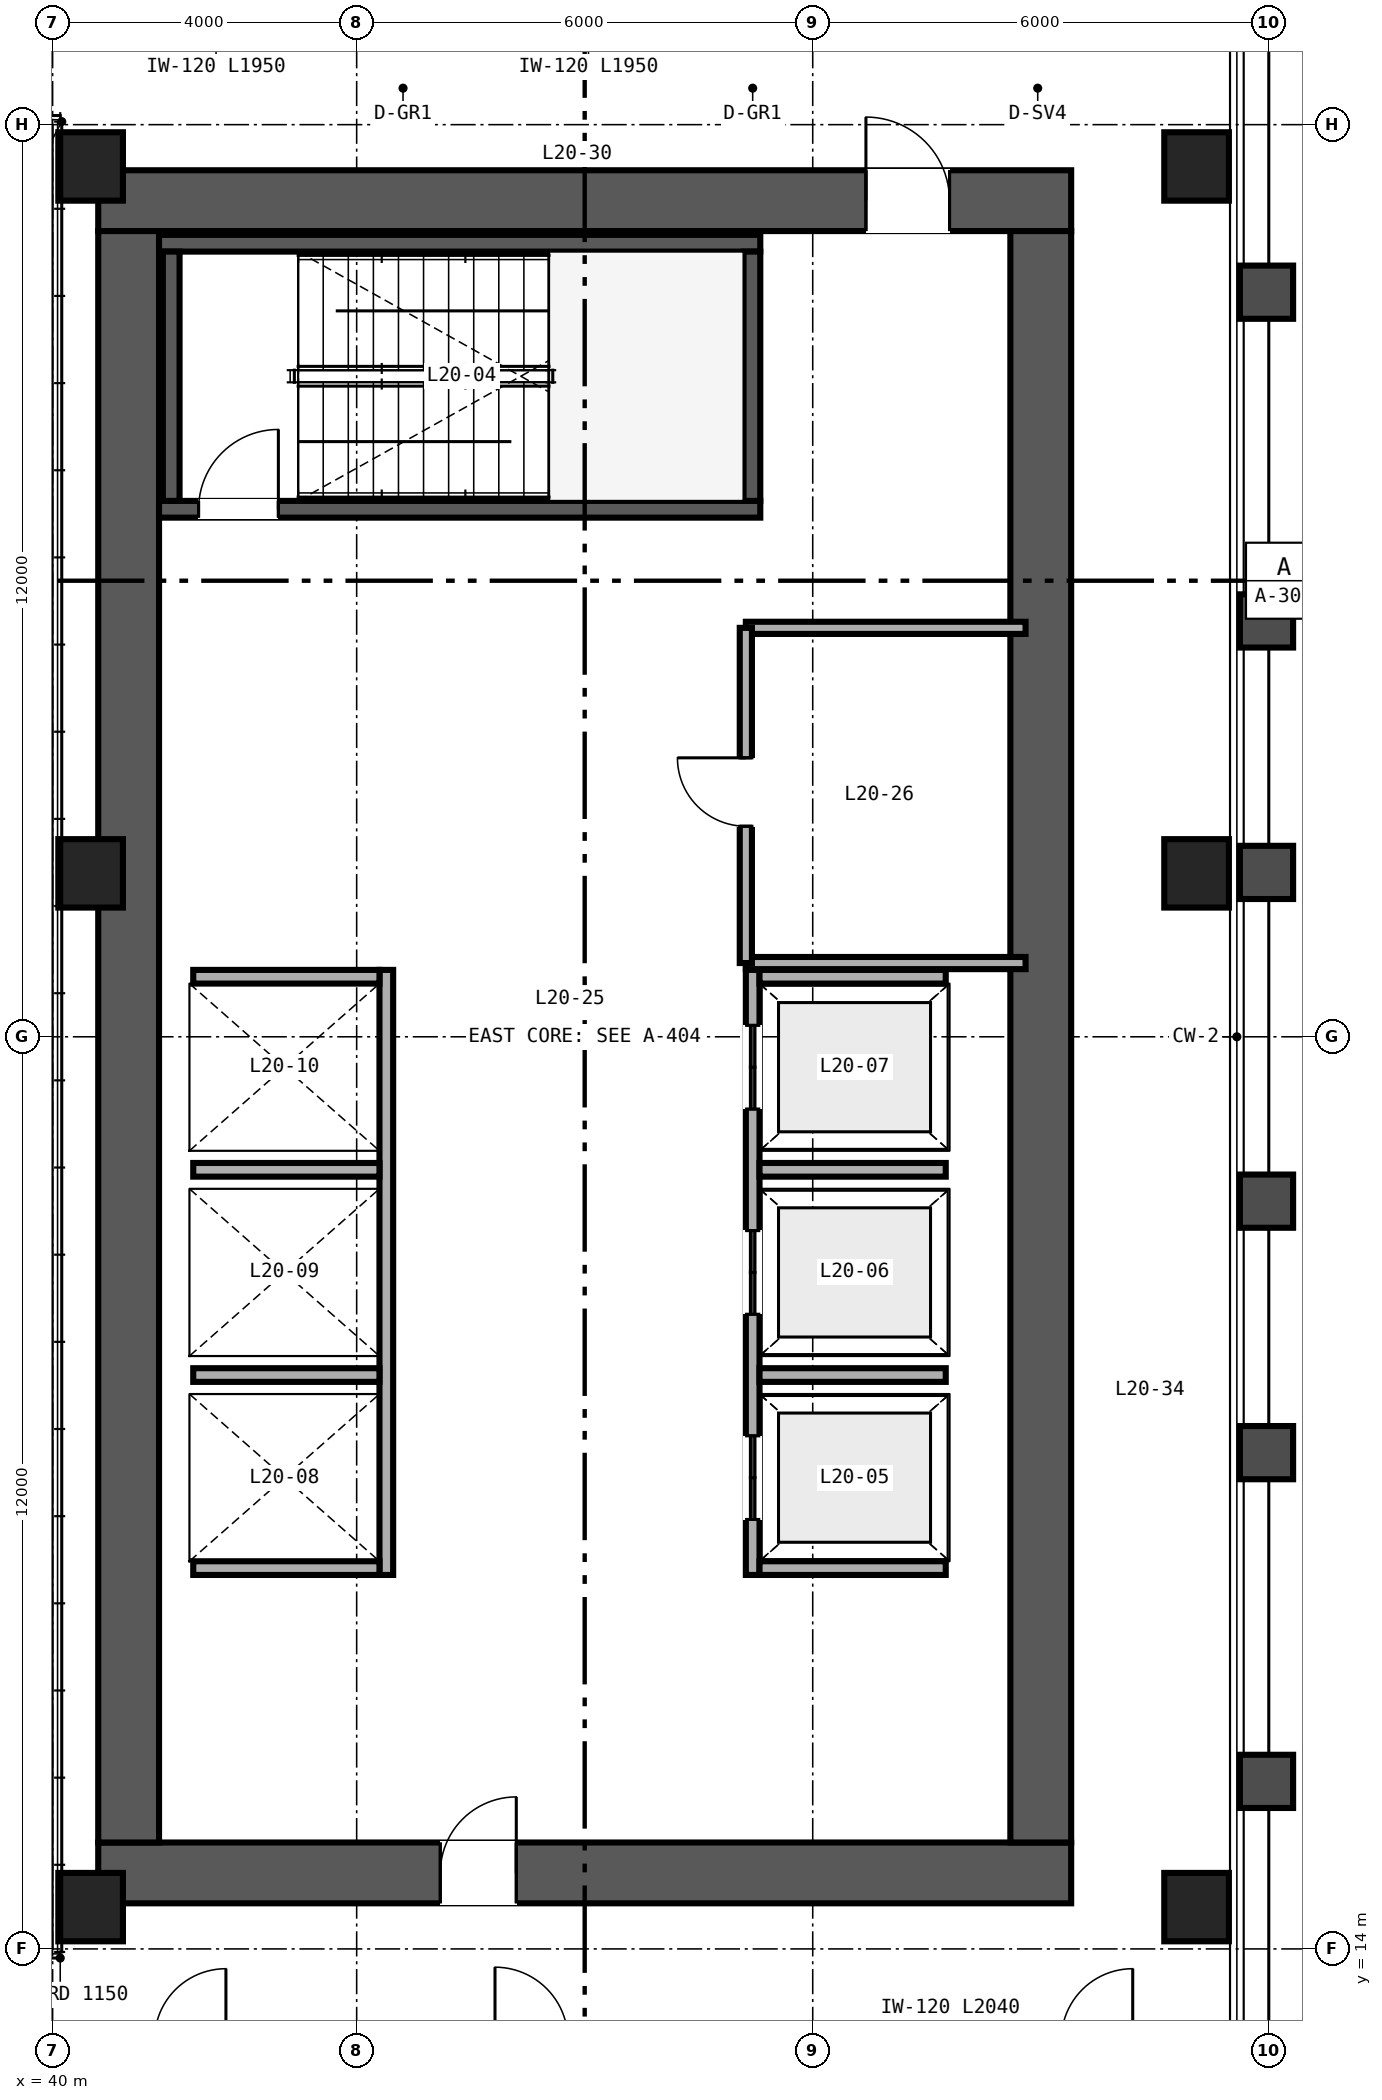
"""IFC4 building model, lengths in metres.
Left out: names, types, materials, properties, quantities, classifications, styles, units other than length and angle.
Written with IfcOpenShell. Run it as: python <this file> out.ifc"""

import sys

from ifc_helpers import new_model, si_unit, direction, frame, frame_2d, origin, origin_2d, place, context, subcontext, project, spatial, rectangle, hollow_rectangle, extrude, source, transform, mapped, element, fill, save


model = new_model("IFC4")
c1 = context("Model", 3, precision=1e-05, world=origin(), true_north=direction((0.0, 1.0)))
c2 = subcontext(c1, "Body", "Model", "MODEL_VIEW")
j1 = project(units=[si_unit("LENGTHUNIT", "METRE"), si_unit("PLANEANGLEUNIT", "RADIAN")], contexts=[c1])
p1 = place(None, origin())
s1 = spatial("IfcSite", under=j1, at=p1, CompositionType="ELEMENT")
p2 = place(p1, origin())
s2 = spatial("IfcBuilding", under=s1, at=p2, CompositionType="ELEMENT")
p3 = place(p2, frame((0.0, 0.0, 81.6)))
s3 = spatial("IfcBuildingStorey", under=s2, at=p3, CompositionType="ELEMENT", Elevation=81.6)
p4 = place(p3, frame((40.6, 15.0, 0.0), z_axis=(0.0, 0.0, 1.0), x_axis=(1.0, 0.0, 0.0)))
e1 = element("IfcWall", 1, at=p4, inside=s3, PredefinedType="SHEAR", context=c2, shape_type="SweptSolid", body=[
    extrude(rectangle(XDim=12.8, YDim=0.8, at=frame_2d((6.4, 0.0))), origin(), (0.0, 0.0, 1.0), 3.28),
])
p5 = place(p4, frame((4.5, 0.0, 0.0)))
e2 = element("IfcOpeningElement", 2, at=p5, cuts=e1, PredefinedType="OPENING", context=c2, shape_type="SweptSolid", body=[
    extrude(rectangle(XDim=1.0, YDim=2.15, at=frame_2d((0.5, 1.075))), frame((0.0, 0.41, 0.0), z_axis=(0.0, -1.0, 0.0), x_axis=(1.0, 0.0, 0.0)), (0.0, 0.0, 1.0), 0.82),
])
p6 = place(p3, frame((40.6, 37.0, 0.0), z_axis=(0.0, 0.0, 1.0), x_axis=(1.0, 0.0, 0.0)))
e3 = element("IfcWall", 3, at=p6, inside=s3, PredefinedType="SHEAR", context=c2, shape_type="SweptSolid", body=[
    extrude(rectangle(XDim=12.8, YDim=0.8, at=frame_2d((6.4, 0.0))), origin(), (0.0, 0.0, 1.0), 3.28),
])
p7 = place(p6, frame((10.1, 0.0, 0.0)))
e4 = element("IfcOpeningElement", 4, at=p7, cuts=e3, PredefinedType="OPENING", context=c2, shape_type="SweptSolid", body=[
    extrude(rectangle(XDim=1.1, YDim=2.15, at=frame_2d((0.55, 1.075))), frame((0.0, 0.41, 0.0), z_axis=(0.0, -1.0, 0.0), x_axis=(1.0, 0.0, 0.0)), (0.0, 0.0, 1.0), 0.82),
])
for number, where, z_axis, x_axis in (
    (5, (41.0, 15.4, 0.0), (0.0, 0.0, 1.0), (0.0, 1.0, 0.0)),
    (6, (53.0, 15.4, 0.0), (0.0, 0.0, 1.0), (0.0, 1.0, 0.0)),
):
    element("IfcWall", number, at=place(p3, frame(where, z_axis=z_axis, x_axis=x_axis)), inside=s3, PredefinedType="SHEAR", context=c2, shape_type="SweptSolid", body=[
        extrude(rectangle(XDim=21.2, YDim=0.8, at=frame_2d((10.6, 0.0))), origin(), (0.0, 0.0, 1.0), 3.28),
    ])
p8 = place(p3, frame((41.4, 32.94, 0.0), z_axis=(0.0, 0.0, 1.0), x_axis=(1.0, 0.0, 0.0)))
e7 = element("IfcWall", 7, at=p8, inside=s3, PredefinedType="SHEAR", context=c2, shape_type="SweptSolid", body=[
    extrude(rectangle(XDim=7.91, YDim=0.22, at=frame_2d((3.955, 0.0))), origin(), (0.0, 0.0, 1.0), 3.4),
])
p9 = place(p8, frame((0.52, 0.0, 0.0)))
e8 = element("IfcOpeningElement", 8, at=p9, cuts=e7, PredefinedType="OPENING", context=c2, shape_type="SweptSolid", body=[
    extrude(rectangle(XDim=1.05, YDim=2.15, at=frame_2d((0.525, 1.075))), frame((0.0, 0.12, 0.0), z_axis=(0.0, -1.0, 0.0), x_axis=(1.0, 0.0, 0.0)), (0.0, 0.0, 1.0), 0.24),
])
p10 = place(p3, frame((41.4, 36.44, 0.0), z_axis=(0.0, 0.0, 1.0), x_axis=(1.0, 0.0, 0.0)))
e9 = element("IfcWall", 9, at=p10, inside=s3, PredefinedType="SHEAR", context=c2, shape_type="SweptSolid", body=[
    extrude(rectangle(XDim=7.91, YDim=0.22, at=frame_2d((3.955, 0.0))), origin(), (0.0, 0.0, 1.0), 3.4),
])
for number, where, z_axis, x_axis in (
    (10, (41.56, 33.05, 0.0), (0.0, 0.0, 1.0), (0.0, 1.0, 0.0)),
    (11, (49.2, 33.05, 0.0), (0.0, 0.0, 1.0), (0.0, 1.0, 0.0)),
):
    element("IfcWall", number, at=place(p3, frame(where, z_axis=z_axis, x_axis=x_axis)), inside=s3, PredefinedType="SHEAR", context=c2, shape_type="SweptSolid", body=[
        extrude(rectangle(XDim=3.28, YDim=0.22, at=frame_2d((1.64, 0.0))), origin(), (0.0, 0.0, 1.0), 3.4),
    ])
m1 = source(origin(), c2, "Body", "SweptSolid", [
    extrude(hollow_rectangle(XDim=0.85, YDim=0.9, WallThickness=0.04, at=origin_2d()), origin(), (0.0, 0.0, 1.0), 3.28),
])
for number, where, z_axis, x_axis in (
    (12, (40.5, 14.55, 0.0), (0.0, 0.0, 1.0), (1.0, 0.0, 0.0)),
    (13, (55.05, 14.55, 0.0), (0.0, 0.0, 1.0), (1.0, 0.0, 0.0)),
    (14, (40.5, 28.15, 0.0), (0.0, 0.0, 1.0), (1.0, 0.0, 0.0)),
    (15, (55.05, 28.15, 0.0), (0.0, 0.0, 1.0), (1.0, 0.0, 0.0)),
    (16, (40.5, 37.45, 0.0), (0.0, 0.0, 1.0), (1.0, 0.0, 0.0)),
    (17, (55.05, 37.45, 0.0), (0.0, 0.0, 1.0), (1.0, 0.0, 0.0)),
):
    element("IfcColumn", number, at=place(p3, frame(where, z_axis=z_axis, x_axis=x_axis)), inside=s3, PredefinedType="COLUMN", context=c2, shape_type="MappedRepresentation", body=[
        mapped(m1, transform((0.0, 0.0, 0.0), scale=1.0)),
    ])
p11 = place(p3, frame((49.21, 18.92, 0.0), z_axis=(0.0, 0.0, 1.0), x_axis=(0.0, 1.0, 0.0)))
e18 = element("IfcWall", 18, at=p11, inside=s3, PredefinedType="SOLIDWALL", context=c2, shape_type="SweptSolid", body=[
    extrude(rectangle(XDim=7.96, YDim=0.18, at=frame_2d((3.98, 0.0))), origin(), (0.0, 0.0, 1.0), 3.28),
])
p12 = place(p11, frame((0.73, 0.0, 0.0)))
e19 = element("IfcOpeningElement", 19, at=p12, cuts=e18, PredefinedType="OPENING", context=c2, shape_type="SweptSolid", body=[
    extrude(rectangle(XDim=1.1, YDim=2.2, at=frame_2d((0.55, 1.1))), frame((0.0, 0.1, 0.0), z_axis=(0.0, -1.0, 0.0), x_axis=(1.0, 0.0, 0.0)), (0.0, 0.0, 1.0), 0.2),
])
p13 = place(p11, frame((3.43, 0.0, 0.0)))
e20 = element("IfcOpeningElement", 20, at=p13, cuts=e18, PredefinedType="OPENING", context=c2, shape_type="SweptSolid", body=[
    extrude(rectangle(XDim=1.1, YDim=2.2, at=frame_2d((0.55, 1.1))), frame((0.0, 0.1, 0.0), z_axis=(0.0, -1.0, 0.0), x_axis=(1.0, 0.0, 0.0)), (0.0, 0.0, 1.0), 0.2),
])
p14 = place(p11, frame((6.13, 0.0, 0.0)))
e21 = element("IfcOpeningElement", 21, at=p14, cuts=e18, PredefinedType="OPENING", context=c2, shape_type="SweptSolid", body=[
    extrude(rectangle(XDim=1.1, YDim=2.2, at=frame_2d((0.55, 1.1))), frame((0.0, 0.1, 0.0), z_axis=(0.0, -1.0, 0.0), x_axis=(1.0, 0.0, 0.0)), (0.0, 0.0, 1.0), 0.2),
])
for number, where, z_axis, x_axis in (
    (22, (49.3, 19.01, 0.0), (0.0, 0.0, 1.0), (1.0, 0.0, 0.0)),
    (23, (49.3, 26.79, 0.0), (0.0, 0.0, 1.0), (1.0, 0.0, 0.0)),
    (24, (49.3, 21.55, 0.0), (0.0, 0.0, 1.0), (1.0, 0.0, 0.0)),
    (25, (49.3, 24.25, 0.0), (0.0, 0.0, 1.0), (1.0, 0.0, 0.0)),
):
    element("IfcWall", number, at=place(p3, frame(where, z_axis=z_axis, x_axis=x_axis)), inside=s3, PredefinedType="SOLIDWALL", context=c2, shape_type="SweptSolid", body=[
        extrude(rectangle(XDim=2.45, YDim=0.18, at=frame_2d((1.225, 0.0))), origin(), (0.0, 0.0, 1.0), 3.28),
    ])
p15 = place(p3, frame((44.39, 18.92, 0.0), z_axis=(0.0, 0.0, 1.0), x_axis=(0.0, 1.0, 0.0)))
e26 = element("IfcWall", 26, at=p15, inside=s3, PredefinedType="SOLIDWALL", context=c2, shape_type="SweptSolid", body=[
    extrude(rectangle(XDim=7.96, YDim=0.18, at=frame_2d((3.98, 0.0))), origin(), (0.0, 0.0, 1.0), 3.28),
])
for number, where, z_axis, x_axis in (
    (27, (41.85, 19.01, 0.0), (0.0, 0.0, 1.0), (1.0, 0.0, 0.0)),
    (28, (41.85, 26.79, 0.0), (0.0, 0.0, 1.0), (1.0, 0.0, 0.0)),
    (29, (41.85, 21.55, 0.0), (0.0, 0.0, 1.0), (1.0, 0.0, 0.0)),
    (30, (41.85, 24.25, 0.0), (0.0, 0.0, 1.0), (1.0, 0.0, 0.0)),
):
    element("IfcWall", number, at=place(p3, frame(where, z_axis=z_axis, x_axis=x_axis)), inside=s3, PredefinedType="SOLIDWALL", context=c2, shape_type="SweptSolid", body=[
        extrude(rectangle(XDim=2.45, YDim=0.18, at=frame_2d((1.225, 0.0))), origin(), (0.0, 0.0, 1.0), 3.28),
    ])
p16 = place(p3, frame((49.12, 26.97, 0.0), z_axis=(0.0, 0.0, 1.0), x_axis=(1.0, 0.0, 0.0)))
e31 = element("IfcWall", 31, at=p16, inside=s3, PredefinedType="PARTITIONING", context=c2, shape_type="SweptSolid", body=[
    extrude(rectangle(XDim=3.68, YDim=0.16, at=frame_2d((1.84, 0.0))), origin(), (0.0, 0.0, 1.0), 3.28),
])
p17 = place(p3, frame((49.12, 31.38, 0.0), z_axis=(0.0, 0.0, 1.0), x_axis=(1.0, 0.0, 0.0)))
e32 = element("IfcWall", 32, at=p17, inside=s3, PredefinedType="PARTITIONING", context=c2, shape_type="SweptSolid", body=[
    extrude(rectangle(XDim=3.68, YDim=0.16, at=frame_2d((1.84, 0.0))), origin(), (0.0, 0.0, 1.0), 2.36),
])
p18 = place(p3, frame((49.12, 26.97, 0.0), z_axis=(0.0, 0.0, 1.0), x_axis=(0.0, 1.0, 0.0)))
e33 = element("IfcWall", 33, at=p18, inside=s3, PredefinedType="PARTITIONING", context=c2, shape_type="SweptSolid", body=[
    extrude(rectangle(XDim=4.41, YDim=0.16, at=frame_2d((2.205, 0.0))), origin(), (0.0, 0.0, 1.0), 2.36),
])
p19 = place(p18, frame((1.8, 0.0, 0.0)))
e34 = element("IfcOpeningElement", 34, at=p19, cuts=e33, PredefinedType="OPENING", context=c2, shape_type="SweptSolid", body=[
    extrude(rectangle(XDim=0.9, YDim=2.15, at=frame_2d((0.45, 1.075))), frame((0.0, 0.09, 0.0), z_axis=(0.0, -1.0, 0.0), x_axis=(1.0, 0.0, 0.0)), (0.0, 0.0, 1.0), 0.18),
])
m2 = source(origin(), c2, "Body", "SweptSolid", [
    extrude(rectangle(XDim=1.05, YDim=2.15, at=frame_2d((0.525, 1.075))), frame((0.0, 0.025, 0.0), z_axis=(0.0, -1.0, 0.0), x_axis=(1.0, 0.0, 0.0)), (0.0, 0.0, 1.0), 0.05),
])
p20 = place(p9, origin())
e35 = element("IfcDoor", 35, at=p20, inside=s3, OperationType="SINGLE_SWING_RIGHT", PredefinedType="DOOR", context=c2, shape_type="MappedRepresentation", body=[
    mapped(m2, transform((0.0, 0.0, 0.0), scale=1.0)),
])
fill(e8, e35)
m3 = source(origin(), c2, "Body", "SweptSolid", [
    extrude(rectangle(XDim=1.1, YDim=2.2, at=frame_2d((0.55, 1.1))), frame((0.0, 0.025, 0.0), z_axis=(0.0, -1.0, 0.0), x_axis=(1.0, 0.0, 0.0)), (0.0, 0.0, 1.0), 0.05),
])
p21 = place(p12, origin())
e36 = element("IfcDoor", 36, at=p21, inside=s3, OperationType="DOUBLE_DOOR_SLIDING", PredefinedType="DOOR", context=c2, shape_type="MappedRepresentation", body=[
    mapped(m3, transform((0.0, 0.0, 0.0), scale=1.0)),
])
fill(e19, e36)
p22 = place(p13, origin())
e37 = element("IfcDoor", 37, at=p22, inside=s3, OperationType="DOUBLE_DOOR_SLIDING", PredefinedType="DOOR", context=c2, shape_type="MappedRepresentation", body=[
    mapped(m3, transform((0.0, 0.0, 0.0), scale=1.0)),
])
fill(e20, e37)
p23 = place(p14, origin())
e38 = element("IfcDoor", 38, at=p23, inside=s3, OperationType="DOUBLE_DOOR_SLIDING", PredefinedType="DOOR", context=c2, shape_type="MappedRepresentation", body=[
    mapped(m3, transform((0.0, 0.0, 0.0), scale=1.0)),
])
fill(e21, e38)
m4 = source(origin(), c2, "Body", "SweptSolid", [
    extrude(rectangle(XDim=1.0, YDim=2.15, at=frame_2d((0.5, 1.075))), frame((0.0, 0.025, 0.0), z_axis=(0.0, -1.0, 0.0), x_axis=(1.0, 0.0, 0.0)), (0.0, 0.0, 1.0), 0.05),
])
p24 = place(p5, origin())
e39 = element("IfcDoor", 39, at=p24, inside=s3, OperationType="SINGLE_SWING_RIGHT", PredefinedType="DOOR", context=c2, shape_type="MappedRepresentation", body=[
    mapped(m4, transform((0.0, 0.0, 0.0), scale=1.0)),
])
fill(e2, e39)
m5 = source(origin(), c2, "Body", "SweptSolid", [
    extrude(rectangle(XDim=1.1, YDim=2.15, at=frame_2d((0.55, 1.075))), frame((0.0, 0.025, 0.0), z_axis=(0.0, -1.0, 0.0), x_axis=(1.0, 0.0, 0.0)), (0.0, 0.0, 1.0), 0.05),
])
p25 = place(p7, origin())
e40 = element("IfcDoor", 40, at=p25, inside=s3, OperationType="SINGLE_SWING_LEFT", PredefinedType="DOOR", context=c2, shape_type="MappedRepresentation", body=[
    mapped(m5, transform((0.0, 0.0, 0.0), scale=1.0)),
])
fill(e4, e40)
m6 = source(origin(), c2, "Body", "SweptSolid", [
    extrude(rectangle(XDim=0.9, YDim=2.15, at=frame_2d((0.45, 1.075))), frame((0.0, 0.025, 0.0), z_axis=(0.0, -1.0, 0.0), x_axis=(1.0, 0.0, 0.0)), (0.0, 0.0, 1.0), 0.05),
])
p26 = place(p19, origin())
e41 = element("IfcDoor", 41, at=p26, inside=s3, OperationType="SINGLE_SWING_RIGHT", PredefinedType="DOOR", context=c2, shape_type="MappedRepresentation", body=[
    mapped(m6, transform((0.0, 0.0, 0.0), scale=1.0)),
])
fill(e34, e41)
save(model, sys.argv[1])
